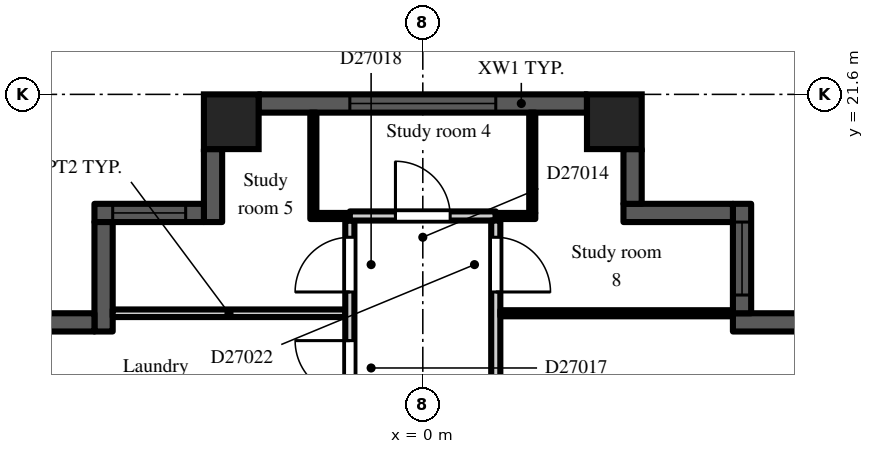
"""IFC4 building model, lengths in metres.
Left out: names, types, materials, properties, quantities, classifications, styles, units other than length and angle.
Written with IfcOpenShell. Run it as: python <this file> out.ifc"""

import sys

from ifc_helpers import new_model, si_unit, direction, frame, frame_2d, origin, origin_2d, place, context, subcontext, project, spatial, rectangle, extrude, element, fill, save


model = new_model("IFC4")
c1 = context("Model", 3, precision=1e-05, world=origin(), true_north=direction((0.0, 1.0)))
c2 = subcontext(c1, "Body", "Model", "MODEL_VIEW")
j1 = project(units=[si_unit("LENGTHUNIT", "METRE"), si_unit("PLANEANGLEUNIT", "RADIAN")], contexts=[c1])
p1 = place(None, origin())
s1 = spatial("IfcSite", under=j1, at=p1, CompositionType="ELEMENT")
p2 = place(p1, origin())
s2 = spatial("IfcBuilding", under=s1, at=p2, CompositionType="ELEMENT")
p3 = place(p2, frame((0.0, 0.0, 188.7)))
s3 = spatial("IfcBuildingStorey", under=s2, at=p3, CompositionType="ELEMENT", Elevation=188.7)
for number, where, z_axis, x_axis in (
    (1, (-3.15, 21.15, 0.0), (0.0, 0.0, 1.0), (1.0, 0.0, 0.0)),
    (2, (3.15, 21.15, 0.0), (0.0, 0.0, 1.0), (1.0, 0.0, 0.0)),
):
    element("IfcColumn", number, at=place(p3, frame(where, z_axis=z_axis, x_axis=x_axis)), inside=s3, PredefinedType="COLUMN", context=c2, shape_type="SweptSolid", body=[
        extrude(rectangle(XDim=0.9, YDim=0.9, at=origin_2d()), origin(), (0.0, 0.0, 1.0), 3.0),
    ])
p4 = place(p3, frame((6.3, 17.85, 0.0), z_axis=(0.0, 0.0, 1.0), x_axis=(-1.0, 0.0, 0.0)))
e3 = element("IfcWall", 3, at=p4, inside=s3, PredefinedType="SOLIDWALL", context=c2, shape_type="SweptSolid", body=[
    extrude(rectangle(XDim=1.2, YDim=0.3, at=frame_2d((0.6, 0.0))), origin(), (0.0, 0.0, 1.0), 2.6),
])
p5 = place(p3, frame((5.25, 18.0, 0.0), z_axis=(0.0, 0.0, 1.0), x_axis=(0.0, 1.0, 0.0)))
e4 = element("IfcWall", 4, at=p5, inside=s3, PredefinedType="SOLIDWALL", context=c2, shape_type="SweptSolid", body=[
    extrude(rectangle(XDim=1.8, YDim=0.3, at=frame_2d((0.9, 0.0))), origin(), (0.0, 0.0, 1.0), 2.6),
])
p6 = place(p5, frame((0.3, 0.0, 0.2)))
e5 = element("IfcOpeningElement", 5, at=p6, cuts=e4, PredefinedType="OPENING", context=c2, shape_type="SweptSolid", body=[
    extrude(rectangle(XDim=1.2, YDim=1.85, at=frame_2d((0.6, 0.925))), frame((0.0, 0.16, 0.0), z_axis=(0.0, -1.0, 0.0), x_axis=(1.0, 0.0, 0.0)), (0.0, 0.0, 1.0), 0.32),
])
p7 = place(p3, frame((5.1, 19.65, 0.0), z_axis=(0.0, 0.0, 1.0), x_axis=(-1.0, 0.0, 0.0)))
e6 = element("IfcWall", 6, at=p7, inside=s3, PredefinedType="SOLIDWALL", context=c2, shape_type="SweptSolid", body=[
    extrude(rectangle(XDim=1.8, YDim=0.3, at=frame_2d((0.9, 0.0))), origin(), (0.0, 0.0, 1.0), 2.6),
])
p8 = place(p3, frame((3.45, 19.8, 0.0), z_axis=(0.0, 0.0, 1.0), x_axis=(0.0, 1.0, 0.0)))
e7 = element("IfcWall", 7, at=p8, inside=s3, PredefinedType="SOLIDWALL", context=c2, shape_type="SweptSolid", body=[
    extrude(rectangle(XDim=0.9, YDim=0.3, at=frame_2d((0.45, 0.0))), origin(), (0.0, 0.0, 1.0), 2.6),
])
p9 = place(p3, frame((2.7, 21.45, 0.0), z_axis=(0.0, 0.0, 1.0), x_axis=(-1.0, 0.0, 0.0)))
e8 = element("IfcWall", 8, at=p9, inside=s3, PredefinedType="SOLIDWALL", context=c2, shape_type="SweptSolid", body=[
    extrude(rectangle(XDim=5.4, YDim=0.3, at=frame_2d((2.7, 0.0))), origin(), (0.0, 0.0, 1.0), 2.2),
])
p10 = place(p9, frame((1.5, 0.0, 0.2)))
e9 = element("IfcOpeningElement", 9, at=p10, cuts=e8, PredefinedType="OPENING", context=c2, shape_type="SweptSolid", body=[
    extrude(rectangle(XDim=2.4, YDim=1.85, at=frame_2d((1.2, 0.925))), frame((0.0, 0.16, 0.0), z_axis=(0.0, -1.0, 0.0), x_axis=(1.0, 0.0, 0.0)), (0.0, 0.0, 1.0), 0.32),
])
p11 = place(p3, frame((-3.45, 20.7, 0.0), z_axis=(0.0, 0.0, 1.0), x_axis=(0.0, -1.0, 0.0)))
e10 = element("IfcWall", 10, at=p11, inside=s3, PredefinedType="SOLIDWALL", context=c2, shape_type="SweptSolid", body=[
    extrude(rectangle(XDim=1.2, YDim=0.3, at=frame_2d((0.6, 0.0))), origin(), (0.0, 0.0, 1.0), 2.6),
])
p12 = place(p3, frame((-3.6, 19.65, 0.0), z_axis=(0.0, 0.0, 1.0), x_axis=(-1.0, 0.0, 0.0)))
e11 = element("IfcWall", 11, at=p12, inside=s3, PredefinedType="SOLIDWALL", context=c2, shape_type="SweptSolid", body=[
    extrude(rectangle(XDim=1.8, YDim=0.3, at=frame_2d((0.9, 0.0))), origin(), (0.0, 0.0, 1.0), 2.6),
])
p13 = place(p12, frame((0.3, 0.0, 0.2)))
e12 = element("IfcOpeningElement", 12, at=p13, cuts=e11, PredefinedType="OPENING", context=c2, shape_type="SweptSolid", body=[
    extrude(rectangle(XDim=1.2, YDim=1.85, at=frame_2d((0.6, 0.925))), frame((0.0, 0.16, 0.0), z_axis=(0.0, -1.0, 0.0), x_axis=(1.0, 0.0, 0.0)), (0.0, 0.0, 1.0), 0.32),
])
p14 = place(p3, frame((-5.25, 19.5, 0.0), z_axis=(0.0, 0.0, 1.0), x_axis=(0.0, -1.0, 0.0)))
e13 = element("IfcWall", 13, at=p14, inside=s3, PredefinedType="SOLIDWALL", context=c2, shape_type="SweptSolid", body=[
    extrude(rectangle(XDim=1.8, YDim=0.3, at=frame_2d((0.9, 0.0))), origin(), (0.0, 0.0, 1.0), 2.6),
])
p15 = place(p3, frame((-5.4, 17.85, 0.0), z_axis=(0.0, 0.0, 1.0), x_axis=(-1.0, 0.0, 0.0)))
e14 = element("IfcWall", 14, at=p15, inside=s3, PredefinedType="SOLIDWALL", context=c2, shape_type="SweptSolid", body=[
    extrude(rectangle(XDim=0.9, YDim=0.3, at=frame_2d((0.45, 0.0))), origin(), (0.0, 0.0, 1.0), 2.6),
])
p16 = place(p3, frame((-5.1, 18.0, 0.0), z_axis=(0.0, 0.0, 1.0), x_axis=(1.0, 0.0, 0.0)))
e15 = element("IfcWall", 15, at=p16, inside=s3, PredefinedType="PARTITIONING", context=c2, shape_type="SweptSolid", body=[
    extrude(rectangle(XDim=3.825, YDim=0.125, at=frame_2d((1.913, 0.0))), origin(), (0.0, 0.0, 1.0), 2.6),
])
p17 = place(p3, frame((-1.8, 19.55, 0.0), z_axis=(0.0, 0.0, 1.0), x_axis=(0.0, 1.0, 0.0)))
e16 = element("IfcWall", 16, at=p17, inside=s3, PredefinedType="PARTITIONING", context=c2, shape_type="SweptSolid", body=[
    extrude(rectangle(XDim=1.75, YDim=0.1, at=frame_2d((0.875, 0.0))), origin(), (0.0, 0.0, 1.0), 2.6),
])
p18 = place(p3, frame((-1.75, 19.6, 0.0), z_axis=(0.0, 0.0, 1.0), x_axis=(1.0, 0.0, 0.0)))
e17 = element("IfcWall", 17, at=p18, inside=s3, PredefinedType="PARTITIONING", context=c2, shape_type="SweptSolid", body=[
    extrude(rectangle(XDim=0.55, YDim=0.1, at=frame_2d((0.275, 0.0))), origin(), (0.0, 0.0, 1.0), 2.6),
])
p19 = place(p3, frame((-1.2, 1.275, 0.0), z_axis=(0.0, 0.0, 1.0), x_axis=(0.0, 1.0, 0.0)))
e18 = element("IfcWall", 18, at=p19, inside=s3, PredefinedType="PARTITIONING", context=c2, shape_type="SweptSolid", body=[
    extrude(rectangle(XDim=18.25, YDim=0.15, at=frame_2d((9.125, 0.0))), origin(), (0.0, 0.0, 1.0), 2.6),
])
p20 = place(p19, frame((2.475, 0.0, 0.0)))
e19 = element("IfcOpeningElement", 19, at=p20, cuts=e18, PredefinedType="OPENING", context=c2, shape_type="SweptSolid", body=[
    extrude(rectangle(XDim=0.9, YDim=2.1, at=frame_2d((0.45, 1.05))), frame((0.0, 0.085, 0.0), z_axis=(0.0, -1.0, 0.0), x_axis=(1.0, 0.0, 0.0)), (0.0, 0.0, 1.0), 0.17),
])
p21 = place(p19, frame((10.875, 0.0, 0.0)))
e20 = element("IfcOpeningElement", 20, at=p21, cuts=e18, PredefinedType="OPENING", context=c2, shape_type="SweptSolid", body=[
    extrude(rectangle(XDim=0.9, YDim=2.1, at=frame_2d((0.45, 1.05))), frame((0.0, 0.085, 0.0), z_axis=(0.0, -1.0, 0.0), x_axis=(1.0, 0.0, 0.0)), (0.0, 0.0, 1.0), 0.17),
])
p22 = place(p19, frame((13.575, 0.0, 0.0)))
e21 = element("IfcOpeningElement", 21, at=p22, cuts=e18, PredefinedType="OPENING", context=c2, shape_type="SweptSolid", body=[
    extrude(rectangle(XDim=0.9, YDim=2.1, at=frame_2d((0.45, 1.05))), frame((0.0, 0.085, 0.0), z_axis=(0.0, -1.0, 0.0), x_axis=(1.0, 0.0, 0.0)), (0.0, 0.0, 1.0), 0.17),
])
p23 = place(p19, frame((15.375, 0.0, 0.0)))
e22 = element("IfcOpeningElement", 22, at=p23, cuts=e18, PredefinedType="OPENING", context=c2, shape_type="SweptSolid", body=[
    extrude(rectangle(XDim=0.9, YDim=2.1, at=frame_2d((0.45, 1.05))), frame((0.0, 0.085, 0.0), z_axis=(0.0, -1.0, 0.0), x_axis=(1.0, 0.0, 0.0)), (0.0, 0.0, 1.0), 0.17),
])
p24 = place(p19, frame((17.075, 0.0, 0.0)))
e23 = element("IfcOpeningElement", 23, at=p24, cuts=e18, PredefinedType="OPENING", context=c2, shape_type="SweptSolid", body=[
    extrude(rectangle(XDim=0.9, YDim=2.1, at=frame_2d((0.45, 1.05))), frame((0.0, 0.085, 0.0), z_axis=(0.0, -1.0, 0.0), x_axis=(1.0, 0.0, 0.0)), (0.0, 0.0, 1.0), 0.17),
])
p25 = place(p3, frame((-1.2, 19.6, 0.0), z_axis=(0.0, 0.0, 1.0), x_axis=(1.0, 0.0, 0.0)))
e24 = element("IfcWall", 24, at=p25, inside=s3, PredefinedType="PARTITIONING", context=c2, shape_type="SweptSolid", body=[
    extrude(rectangle(XDim=2.4, YDim=0.15, at=frame_2d((1.2, 0.0))), origin(), (0.0, 0.0, 1.0), 2.6),
])
p26 = place(p25, frame((0.75, 0.0, 0.0)))
e25 = element("IfcOpeningElement", 25, at=p26, cuts=e24, PredefinedType="OPENING", context=c2, shape_type="SweptSolid", body=[
    extrude(rectangle(XDim=0.9, YDim=2.1, at=frame_2d((0.45, 1.05))), frame((0.0, 0.085, 0.0), z_axis=(0.0, -1.0, 0.0), x_axis=(1.0, 0.0, 0.0)), (0.0, 0.0, 1.0), 0.17),
])
p27 = place(p3, frame((1.2, 1.125, 0.0), z_axis=(0.0, 0.0, 1.0), x_axis=(0.0, 1.0, 0.0)))
e26 = element("IfcWall", 26, at=p27, inside=s3, PredefinedType="PARTITIONING", context=c2, shape_type="SweptSolid", body=[
    extrude(rectangle(XDim=18.4, YDim=0.15, at=frame_2d((9.2, 0.0))), origin(), (0.0, 0.0, 1.0), 2.6),
])
p28 = place(p27, frame((3.825, 0.0, 0.0)))
e27 = element("IfcOpeningElement", 27, at=p28, cuts=e26, PredefinedType="OPENING", context=c2, shape_type="SweptSolid", body=[
    extrude(rectangle(XDim=0.9, YDim=2.1, at=frame_2d((0.45, 1.05))), frame((0.0, 0.085, 0.0), z_axis=(0.0, -1.0, 0.0), x_axis=(1.0, 0.0, 0.0)), (0.0, 0.0, 1.0), 0.17),
])
p29 = place(p27, frame((11.425, 0.0, 0.0)))
e28 = element("IfcOpeningElement", 28, at=p29, cuts=e26, PredefinedType="OPENING", context=c2, shape_type="SweptSolid", body=[
    extrude(rectangle(XDim=0.9, YDim=2.1, at=frame_2d((0.45, 1.05))), frame((0.0, 0.085, 0.0), z_axis=(0.0, -1.0, 0.0), x_axis=(1.0, 0.0, 0.0)), (0.0, 0.0, 1.0), 0.17),
])
p30 = place(p27, frame((7.825, 0.0, 0.0)))
e29 = element("IfcOpeningElement", 29, at=p30, cuts=e26, PredefinedType="OPENING", context=c2, shape_type="SweptSolid", body=[
    extrude(rectangle(XDim=0.9, YDim=2.1, at=frame_2d((0.45, 1.05))), frame((0.0, 0.085, 0.0), z_axis=(0.0, -1.0, 0.0), x_axis=(1.0, 0.0, 0.0)), (0.0, 0.0, 1.0), 0.17),
])
p31 = place(p27, frame((14.625, 0.0, 0.0)))
e30 = element("IfcOpeningElement", 30, at=p31, cuts=e26, PredefinedType="OPENING", context=c2, shape_type="SweptSolid", body=[
    extrude(rectangle(XDim=0.9, YDim=2.1, at=frame_2d((0.45, 1.05))), frame((0.0, 0.085, 0.0), z_axis=(0.0, -1.0, 0.0), x_axis=(1.0, 0.0, 0.0)), (0.0, 0.0, 1.0), 0.17),
])
p32 = place(p27, frame((17.225, 0.0, 0.0)))
e31 = element("IfcOpeningElement", 31, at=p32, cuts=e26, PredefinedType="OPENING", context=c2, shape_type="SweptSolid", body=[
    extrude(rectangle(XDim=0.9, YDim=2.1, at=frame_2d((0.45, 1.05))), frame((0.0, 0.085, 0.0), z_axis=(0.0, -1.0, 0.0), x_axis=(1.0, 0.0, 0.0)), (0.0, 0.0, 1.0), 0.17),
])
p33 = place(p3, frame((1.275, 18.0, 0.0), z_axis=(0.0, 0.0, 1.0), x_axis=(1.0, 0.0, 0.0)))
e32 = element("IfcWall", 32, at=p33, inside=s3, PredefinedType="PARTITIONING", context=c2, shape_type="SweptSolid", body=[
    extrude(rectangle(XDim=3.825, YDim=0.1, at=frame_2d((1.913, 0.0))), origin(), (0.0, 0.0, 1.0), 2.6),
])
p34 = place(p3, frame((1.2, 19.6, 0.0), z_axis=(0.0, 0.0, 1.0), x_axis=(1.0, 0.0, 0.0)))
e33 = element("IfcWall", 33, at=p34, inside=s3, PredefinedType="PARTITIONING", context=c2, shape_type="SweptSolid", body=[
    extrude(rectangle(XDim=0.65, YDim=0.1, at=frame_2d((0.325, 0.0))), origin(), (0.0, 0.0, 1.0), 2.6),
])
p35 = place(p3, frame((1.8, 19.65, 0.0), z_axis=(0.0, 0.0, 1.0), x_axis=(0.0, 1.0, 0.0)))
e34 = element("IfcWall", 34, at=p35, inside=s3, PredefinedType="PARTITIONING", context=c2, shape_type="SweptSolid", body=[
    extrude(rectangle(XDim=1.65, YDim=0.1, at=frame_2d((0.825, 0.0))), origin(), (0.0, 0.0, 1.0), 2.6),
])
p36 = place(p6, origin())
e35 = element("IfcWindow", 35, at=p36, inside=s3, PartitioningType="SINGLE_PANEL", PredefinedType="WINDOW", context=c2, shape_type="SweptSolid", body=[
    extrude(rectangle(XDim=1.2, YDim=1.85, at=frame_2d((0.6, 0.925))), frame((0.0, 0.03, 0.0), z_axis=(0.0, -1.0, 0.0), x_axis=(1.0, 0.0, 0.0)), (0.0, 0.0, 1.0), 0.06),
])
fill(e5, e35)
p37 = place(p10, origin())
e36 = element("IfcWindow", 36, at=p37, inside=s3, PartitioningType="SINGLE_PANEL", PredefinedType="WINDOW", context=c2, shape_type="SweptSolid", body=[
    extrude(rectangle(XDim=2.4, YDim=1.85, at=frame_2d((1.2, 0.925))), frame((0.0, 0.03, 0.0), z_axis=(0.0, -1.0, 0.0), x_axis=(1.0, 0.0, 0.0)), (0.0, 0.0, 1.0), 0.06),
])
fill(e9, e36)
p38 = place(p13, origin())
e37 = element("IfcWindow", 37, at=p38, inside=s3, PartitioningType="SINGLE_PANEL", PredefinedType="WINDOW", context=c2, shape_type="SweptSolid", body=[
    extrude(rectangle(XDim=1.2, YDim=1.85, at=frame_2d((0.6, 0.925))), frame((0.0, 0.03, 0.0), z_axis=(0.0, -1.0, 0.0), x_axis=(1.0, 0.0, 0.0)), (0.0, 0.0, 1.0), 0.06),
])
fill(e12, e37)
p39 = place(p26, origin())
e38 = element("IfcDoor", 38, at=p39, inside=s3, OperationType="SINGLE_SWING_LEFT", PredefinedType="DOOR", context=c2, shape_type="SweptSolid", body=[
    extrude(rectangle(XDim=0.9, YDim=2.1, at=frame_2d((0.45, 1.05))), frame((0.0, 0.025, 0.0), z_axis=(0.0, -1.0, 0.0), x_axis=(1.0, 0.0, 0.0)), (0.0, 0.0, 1.0), 0.05),
])
fill(e25, e38)
p40 = place(p23, origin())
e39 = element("IfcDoor", 39, at=p40, inside=s3, OperationType="SINGLE_SWING_RIGHT", PredefinedType="DOOR", context=c2, shape_type="SweptSolid", body=[
    extrude(rectangle(XDim=0.9, YDim=2.1, at=frame_2d((0.45, 1.05))), frame((0.0, 0.025, 0.0), z_axis=(0.0, -1.0, 0.0), x_axis=(1.0, 0.0, 0.0)), (0.0, 0.0, 1.0), 0.05),
])
fill(e22, e39)
p41 = place(p24, origin())
e40 = element("IfcDoor", 40, at=p41, inside=s3, OperationType="SINGLE_SWING_LEFT", PredefinedType="DOOR", context=c2, shape_type="SweptSolid", body=[
    extrude(rectangle(XDim=0.9, YDim=2.1, at=frame_2d((0.45, 1.05))), frame((0.0, 0.025, 0.0), z_axis=(0.0, -1.0, 0.0), x_axis=(1.0, 0.0, 0.0)), (0.0, 0.0, 1.0), 0.05),
])
fill(e23, e40)
p42 = place(p32, frame((0.9, 0.0, 0.0), z_axis=(0.0, 0.0, 1.0), x_axis=(-1.0, 0.0, 0.0)))
e41 = element("IfcDoor", 41, at=p42, inside=s3, OperationType="SINGLE_SWING_RIGHT", PredefinedType="DOOR", context=c2, shape_type="SweptSolid", body=[
    extrude(rectangle(XDim=0.9, YDim=2.1, at=frame_2d((0.45, 1.05))), frame((0.0, 0.025, 0.0), z_axis=(0.0, -1.0, 0.0), x_axis=(1.0, 0.0, 0.0)), (0.0, 0.0, 1.0), 0.05),
])
fill(e31, e41)
save(model, sys.argv[1])
